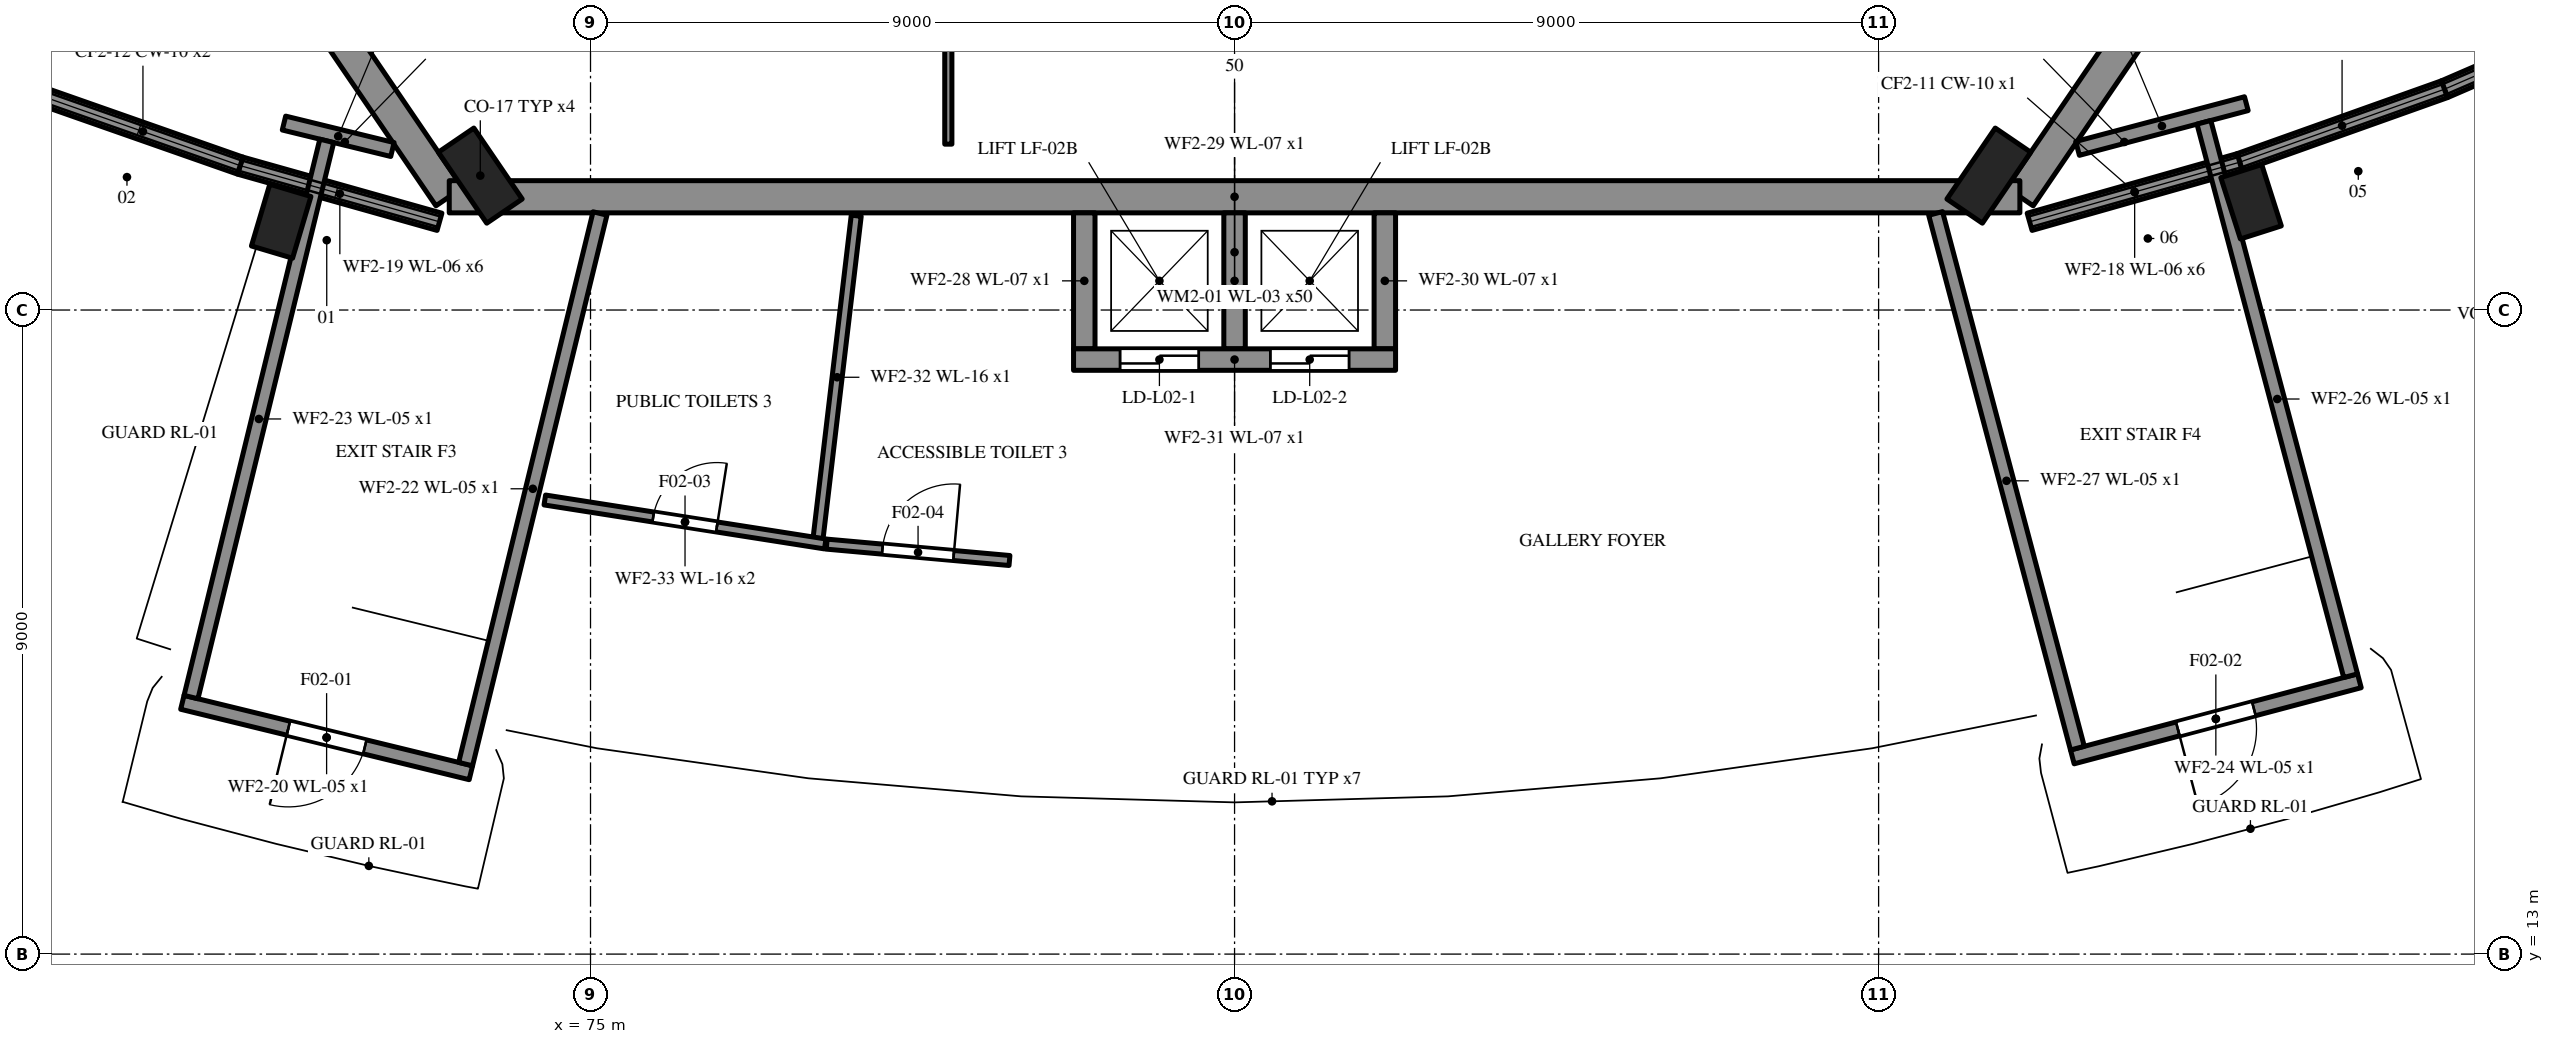
"""IFC4 building model, lengths in metres.
Left out: names, types, materials, properties, quantities, classifications, styles, units other than length and angle.
Written with IfcOpenShell. Run it as: python <this file> out.ifc"""

import sys

from ifc_helpers import new_model, si_unit, direction, frame, frame_2d, origin, origin_2d, place, context, subcontext, project, spatial, polyline, rectangle, outline, extrude, element, fill, save


model = new_model("IFC4")
c1 = context("Model", 3, precision=1e-05, world=origin(), true_north=direction((0.0, 1.0)))
c2 = subcontext(c1, "Body", "Model", "MODEL_VIEW")
j1 = project(units=[si_unit("LENGTHUNIT", "METRE"), si_unit("PLANEANGLEUNIT", "RADIAN")], contexts=[c1])
p1 = place(None, origin())
s1 = spatial("IfcSite", under=j1, at=p1, CompositionType="ELEMENT")
p2 = place(p1, origin())
s2 = spatial("IfcBuilding", under=s1, at=p2, CompositionType="ELEMENT")
p3 = place(p2, frame((0.0, 0.0, 10.2)))
s3 = spatial("IfcBuildingStorey", under=s2, at=p3, CompositionType="ELEMENT", Elevation=10.2)
for number, where, z_axis, x_axis in (
    (1, (94.974, 23.583, 0.0), (0.0, 0.0, 1.0), (0.563, 0.826, 0.0)),
    (2, (71.389, 25.986, 0.0), (0.0, 0.0, 1.0), (0.563, -0.826, 0.0)),
):
    element("IfcWall", number, at=place(p3, frame(where, z_axis=z_axis, x_axis=x_axis)), inside=s3, PredefinedType="SOLIDWALL", context=c2, shape_type="SweptSolid", body=[
        extrude(rectangle(XDim=2.908, YDim=0.45, at=frame_2d((1.454, 0.0))), origin(), (0.0, 0.0, 1.0), 4.6),
    ])
p4 = place(p3, frame((73.026, 23.583, 0.0), z_axis=(0.0, 0.0, 1.0), x_axis=(1.0, 0.0, 0.0)))
e3 = element("IfcWall", 3, at=p4, inside=s3, PredefinedType="SOLIDWALL", context=c2, shape_type="SweptSolid", body=[
    extrude(rectangle(XDim=21.948, YDim=0.45, at=frame_2d((10.974, 0.0))), origin(), (0.0, 0.0, 1.0), 4.6),
])
for number, where, z_axis, x_axis in (
    (4, (94.54, 23.878, 0.0), (0.0, 0.0, 1.0), (0.563, 0.826, 0.0)),
    (5, (73.46, 23.878, 0.0), (0.0, 0.0, 1.0), (0.563, -0.826, 0.0)),
):
    element("IfcColumn", number, at=place(p3, frame(where, z_axis=z_axis, x_axis=x_axis)), inside=s3, PredefinedType="PILASTER", context=c2, shape_type="SweptSolid", body=[
        extrude(rectangle(XDim=1.2, YDim=0.6, at=origin_2d()), origin(), (0.0, 0.0, 1.0), 4.6),
    ])
p5 = place(p3, frame((70.677, 23.241, 0.0), z_axis=(0.0, 0.0, 1.0), x_axis=(-0.285281902737, -0.958443652997, 0.0)))
e6 = element("IfcColumn", 6, at=p5, inside=s3, PredefinedType="PILASTER", context=c2, shape_type="SweptSolid", body=[
    extrude(rectangle(XDim=0.9, YDim=0.6, at=origin_2d()), origin(), (0.0, 0.0, 1.0), 3.868),
])
p6 = place(p3, frame((98.205, 23.513, 0.0), z_axis=(0.0, 0.0, 1.0), x_axis=(0.304171062495, -0.952617428321, 0.0)))
e7 = element("IfcColumn", 7, at=p6, inside=s3, PredefinedType="PILASTER", context=c2, shape_type="SweptSolid", body=[
    extrude(rectangle(XDim=0.9, YDim=0.6, at=origin_2d()), origin(), (0.0, 0.0, 1.0), 3.611),
])
p7 = place(p3, frame((103.696, 26.292, 1.87), z_axis=(0.0, 0.0, 1.0), x_axis=(-0.917822216842, -0.396991660205, 0.0)))
e8 = element("IfcWall", 8, at=p7, inside=s3, PredefinedType="SHEAR", context=c2, shape_type="SweptSolid", body=[
    extrude(outline(polyline([(0.0, 0.0), (3.038, 0.0), (3.038, 1.282), (1.657, 0.884), (1.381, 0.823), (0.0, 0.45), (0.0, 0.0)])), frame((0.0, 0.125, 0.0), z_axis=(0.0, -1.0, 0.0), x_axis=(1.0, 0.0, 0.0)), (0.0, 0.0, 1.0), 0.25),
])
p8 = place(p3, frame((100.907, 25.085, 2.706), z_axis=(0.0, 0.0, 1.0), x_axis=(-0.941947191525, -0.335761058459, 0.0)))
e9 = element("IfcWall", 9, at=p8, inside=s3, PredefinedType="SHEAR", context=c2, shape_type="SweptSolid", body=[
    extrude(outline(polyline([(0.0, 0.0), (3.038, 0.0), (3.038, 1.349), (2.762, 1.275), (0.0, 0.449), (0.0, 0.0)])), frame((0.0, 0.125, 0.0), z_axis=(0.0, -1.0, 0.0), x_axis=(1.0, 0.0, 0.0)), (0.0, 0.0, 1.0), 0.25),
])
p9 = place(p3, frame((98.046, 24.065, 3.607), z_axis=(0.0, 0.0, 1.0), x_axis=(-0.962032579716, -0.272934636065, 0.0)))
e10 = element("IfcWall", 10, at=p9, inside=s3, PredefinedType="SHEAR", context=c2, shape_type="SweptSolid", body=[
    extrude(outline(polyline([(0.0, 0.0), (3.051, 0.0), (3.051, 1.258), (0.277, 0.516), (0.0, 0.449), (0.0, 0.0)])), frame((0.0, 0.125, 0.0), z_axis=(0.0, -1.0, 0.0), x_axis=(1.0, 0.0, 0.0)), (0.0, 0.0, 1.0), 0.25),
])
p10 = place(p3, frame((72.89, 23.233, 3.627), z_axis=(0.0, 0.0, 1.0), x_axis=(-0.962501662404, 0.271275781944, 0.0)))
e11 = element("IfcWall", 11, at=p10, inside=s3, PredefinedType="SHEAR", context=c2, shape_type="SweptSolid", body=[
    extrude(outline(polyline([(0.0, 0.0), (2.893, 0.0), (2.894, 0.449), (2.315, 0.628), (2.025, 0.698), (0.0, 1.203), (0.0, 0.0)])), frame((0.0, 0.125, 0.0), z_axis=(0.0, -1.0, 0.0), x_axis=(1.0, 0.0, 0.0)), (0.0, 0.0, 1.0), 0.25),
])
p11 = place(p3, frame((70.105, 24.018, 2.771), z_axis=(0.0, 0.0, 1.0), x_axis=(-0.943661290444, 0.330912932533, 0.0)))
e12 = element("IfcWall", 12, at=p11, inside=s3, PredefinedType="SHEAR", context=c2, shape_type="SweptSolid", body=[
    extrude(outline(polyline([(0.0, 0.0), (2.88, 0.0), (2.88, 0.449), (0.0, 1.303), (0.0, 0.0)])), frame((0.0, 0.125, 0.0), z_axis=(0.0, -1.0, 0.0), x_axis=(1.0, 0.0, 0.0)), (0.0, 0.0, 1.0), 0.25),
])
p12 = place(p3, frame((80.0, 24.318, 0.0), z_axis=(0.0, 0.0, 1.0), x_axis=(0.0, 1.0, 0.0)))
e13 = element("IfcWall", 13, at=p12, inside=s3, PredefinedType="PARTITIONING", context=c2, shape_type="SweptSolid", body=[
    extrude(rectangle(XDim=5.012, YDim=0.1, at=frame_2d((2.506, 0.0))), origin(), (0.0, 0.0, 1.0), 4.35),
])
p13 = place(p3, frame((73.328, 15.534, 0.0), z_axis=(0.0, 0.0, 1.0), x_axis=(-0.97147374422, 0.237147136374, 0.0)))
e14 = element("IfcWall", 14, at=p13, inside=s3, PredefinedType="SHEAR", context=c2, shape_type="SweptSolid", body=[
    extrude(rectangle(XDim=4.15, YDim=0.2, at=frame_2d((2.075, 0.0))), origin(), (0.0, 0.0, 1.0), 2.733),
])
p14 = place(p13, frame((1.525, 0.0, 0.0)))
e15 = element("IfcOpeningElement", 15, at=p14, cuts=e14, PredefinedType="OPENING", context=c2, shape_type="SweptSolid", body=[
    extrude(rectangle(XDim=1.1, YDim=2.1, at=frame_2d((0.55, 1.05))), frame((0.0, 0.11, 0.0), z_axis=(0.0, -1.0, 0.0), x_axis=(1.0, 0.0, 0.0)), (0.0, 0.0, 1.0), 0.22),
])
p15 = place(p3, frame((72.232, 24.242, 0.0), z_axis=(0.0, 0.0, 1.0), x_axis=(-0.971444715638, 0.237266020446, 0.0)))
e16 = element("IfcWall", 16, at=p15, inside=s3, PredefinedType="SHEAR", context=c2, shape_type="SweptSolid", body=[
    extrude(rectangle(XDim=1.56, YDim=0.2, at=frame_2d((0.78, 0.0))), origin(), (0.0, 0.0, 1.0), 2.733),
])
p16 = place(p3, frame((73.255, 15.655, 0.0), z_axis=(0.0, 0.0, 1.0), x_axis=(0.237142809453, 0.971474800458, 0.0)))
e17 = element("IfcWall", 17, at=p16, inside=s3, PredefinedType="SHEAR", context=c2, shape_type="SweptSolid", body=[
    extrude(rectangle(XDim=7.92, YDim=0.2, at=frame_2d((3.96, 0.0))), origin(), (0.0, 0.0, 1.0), 2.733),
])
p17 = place(p3, frame((69.417, 16.592, 0.0), z_axis=(0.0, 0.0, 1.0), x_axis=(0.2371535898, 0.971472168847, 0.0)))
e18 = element("IfcWall", 18, at=p17, inside=s3, PredefinedType="SHEAR", context=c2, shape_type="SweptSolid", body=[
    extrude(rectangle(XDim=8.0, YDim=0.2, at=frame_2d((4.0, 0.0))), origin(), (0.0, 0.0, 1.0), 2.733),
])
p18 = place(p3, frame((99.718, 16.819, 0.0), z_axis=(0.0, 0.0, 1.0), x_axis=(-0.966590417756, -0.256325894715, 0.0)))
e19 = element("IfcWall", 19, at=p18, inside=s3, PredefinedType="SHEAR", context=c2, shape_type="SweptSolid", body=[
    extrude(rectangle(XDim=4.15, YDim=0.2, at=frame_2d((2.075, 0.0))), origin(), (0.0, 0.0, 1.0), 2.64),
])
p19 = place(p18, frame((1.525, 0.0, 0.0)))
e20 = element("IfcOpeningElement", 20, at=p19, cuts=e19, PredefinedType="OPENING", context=c2, shape_type="SweptSolid", body=[
    extrude(rectangle(XDim=1.1, YDim=2.1, at=frame_2d((0.55, 1.05))), frame((0.0, 0.11, 0.0), z_axis=(0.0, -1.0, 0.0), x_axis=(1.0, 0.0, 0.0)), (0.0, 0.0, 1.0), 0.22),
])
p20 = place(p3, frame((98.138, 24.884, 0.0), z_axis=(0.0, 0.0, 1.0), x_axis=(-0.966582812495, -0.256354572009, 0.0)))
e21 = element("IfcWall", 21, at=p20, inside=s3, PredefinedType="SHEAR", context=c2, shape_type="SweptSolid", body=[
    extrude(rectangle(XDim=2.44, YDim=0.2, at=frame_2d((1.22, 0.0))), origin(), (0.0, 0.0, 1.0), 2.64),
])
p21 = place(p3, frame((99.596, 16.89, 0.0), z_axis=(0.0, 0.0, 1.0), x_axis=(-0.25631948932, 0.966592116352, 0.0)))
e22 = element("IfcWall", 22, at=p21, inside=s3, PredefinedType="SHEAR", context=c2, shape_type="SweptSolid", body=[
    extrude(rectangle(XDim=8.0, YDim=0.2, at=frame_2d((4.0, 0.0))), origin(), (0.0, 0.0, 1.0), 2.64),
])
p22 = place(p3, frame((95.778, 15.878, 0.0), z_axis=(0.0, 0.0, 1.0), x_axis=(-0.256333531377, 0.966588392591, 0.0)))
e23 = element("IfcWall", 23, at=p22, inside=s3, PredefinedType="SHEAR", context=c2, shape_type="SweptSolid", body=[
    extrude(rectangle(XDim=7.73, YDim=0.2, at=frame_2d((3.865, 0.0))), origin(), (0.0, 0.0, 1.0), 2.64),
])
for number, where, z_axis, x_axis in (
    (24, (81.9, 21.458, 0.0), (0.0, 0.0, 1.0), (0.0, 1.0, 0.0)),
    (25, (84.0, 21.458, 0.0), (0.0, 0.0, 1.0), (0.0, 1.0, 0.0)),
    (26, (86.1, 21.458, 0.0), (0.0, 0.0, 1.0), (0.0, 1.0, 0.0)),
):
    element("IfcWall", number, at=place(p3, frame(where, z_axis=z_axis, x_axis=x_axis)), inside=s3, PredefinedType="SHEAR", context=c2, shape_type="SweptSolid", body=[
        extrude(rectangle(XDim=1.9, YDim=0.3, at=frame_2d((0.95, 0.0))), origin(), (0.0, 0.0, 1.0), 4.6),
    ])
p23 = place(p3, frame((81.75, 21.308, 0.0), z_axis=(0.0, 0.0, 1.0), x_axis=(1.0, 0.0, 0.0)))
e27 = element("IfcWall", 27, at=p23, inside=s3, PredefinedType="SHEAR", context=c2, shape_type="SweptSolid", body=[
    extrude(rectangle(XDim=4.5, YDim=0.3, at=frame_2d((2.25, 0.0))), origin(), (0.0, 0.0, 1.0), 4.6),
])
p24 = place(p23, frame((0.65, 0.0, 0.0)))
e28 = element("IfcOpeningElement", 28, at=p24, cuts=e27, PredefinedType="OPENING", context=c2, shape_type="SweptSolid", body=[
    extrude(rectangle(XDim=1.1, YDim=2.2, at=frame_2d((0.55, 1.1))), frame((0.0, 0.16, 0.0), z_axis=(0.0, -1.0, 0.0), x_axis=(1.0, 0.0, 0.0)), (0.0, 0.0, 1.0), 0.32),
])
p25 = place(p23, frame((2.75, 0.0, 0.0)))
e29 = element("IfcOpeningElement", 29, at=p25, cuts=e27, PredefinedType="OPENING", context=c2, shape_type="SweptSolid", body=[
    extrude(rectangle(XDim=1.1, YDim=2.2, at=frame_2d((0.55, 1.1))), frame((0.0, 0.16, 0.0), z_axis=(0.0, -1.0, 0.0), x_axis=(1.0, 0.0, 0.0)), (0.0, 0.0, 1.0), 0.32),
])
p26 = place(p3, frame((78.713, 23.318, 0.0), z_axis=(0.0, 0.0, 1.0), x_axis=(-0.117508051617, -0.993071929824, 0.0)))
e30 = element("IfcWall", 30, at=p26, inside=s3, PredefinedType="PARTITIONING", context=c2, shape_type="SweptSolid", body=[
    extrude(rectangle(XDim=4.546, YDim=0.14, at=frame_2d((2.273, 0.0))), origin(), (0.0, 0.0, 1.0), 4.314),
])
p27 = place(p3, frame((74.361, 19.346, 0.0), z_axis=(0.0, 0.0, 1.0), x_axis=(0.987917678703, -0.154979547379, 0.0)))
e31 = element("IfcWall", 31, at=p27, inside=s3, PredefinedType="PARTITIONING", context=c2, shape_type="SweptSolid", body=[
    extrude(rectangle(XDim=3.967, YDim=0.14, at=frame_2d((1.983, 0.0))), origin(), (0.0, 0.0, 1.0), 4.314),
])
p28 = place(p27, frame((1.533, 0.0, 0.0)))
e32 = element("IfcOpeningElement", 32, at=p28, cuts=e31, PredefinedType="OPENING", context=c2, shape_type="SweptSolid", body=[
    extrude(rectangle(XDim=0.9, YDim=2.1, at=frame_2d((0.45, 1.05))), frame((0.0, 0.08, 0.0), z_axis=(0.0, -1.0, 0.0), x_axis=(1.0, 0.0, 0.0)), (0.0, 0.0, 1.0), 0.16),
])
p29 = place(p3, frame((78.3, 18.729, 0.0), z_axis=(0.0, 0.0, 1.0), x_axis=(0.996014787006, -0.08918825071, 0.0)))
e33 = element("IfcWall", 33, at=p29, inside=s3, PredefinedType="PARTITIONING", context=c2, shape_type="SweptSolid", body=[
    extrude(rectangle(XDim=2.565, YDim=0.14, at=frame_2d((1.282, 0.0))), origin(), (0.0, 0.0, 1.0), 4.857),
])
p30 = place(p29, frame((0.782, 0.0, 0.0)))
e34 = element("IfcOpeningElement", 34, at=p30, cuts=e33, PredefinedType="OPENING", context=c2, shape_type="SweptSolid", body=[
    extrude(rectangle(XDim=1.0, YDim=2.1, at=frame_2d((0.5, 1.05))), frame((0.0, 0.08, 0.0), z_axis=(0.0, -1.0, 0.0), x_axis=(1.0, 0.0, 0.0)), (0.0, 0.0, 1.0), 0.16),
])
p31 = place(p14, origin())
e35 = element("IfcDoor", 35, at=p31, inside=s3, OperationType="SINGLE_SWING_RIGHT", PredefinedType="DOOR", context=c2, shape_type="SweptSolid", body=[
    extrude(rectangle(XDim=1.1, YDim=2.1, at=frame_2d((0.55, 1.05))), frame((0.0, 0.025, 0.0), z_axis=(0.0, -1.0, 0.0), x_axis=(1.0, 0.0, 0.0)), (0.0, 0.0, 1.0), 0.05),
])
fill(e15, e35)
p32 = place(p19, origin())
e36 = element("IfcDoor", 36, at=p32, inside=s3, OperationType="SINGLE_SWING_RIGHT", PredefinedType="DOOR", context=c2, shape_type="SweptSolid", body=[
    extrude(rectangle(XDim=1.1, YDim=2.1, at=frame_2d((0.55, 1.05))), frame((0.0, 0.025, 0.0), z_axis=(0.0, -1.0, 0.0), x_axis=(1.0, 0.0, 0.0)), (0.0, 0.0, 1.0), 0.05),
])
fill(e20, e36)
p33 = place(p24, origin())
e37 = element("IfcDoor", 37, at=p33, inside=s3, OperationType="SLIDING_TO_LEFT", PredefinedType="DOOR", context=c2, shape_type="SweptSolid", body=[
    extrude(rectangle(XDim=1.1, YDim=2.2, at=frame_2d((0.55, 1.1))), frame((0.0, 0.025, 0.0), z_axis=(0.0, -1.0, 0.0), x_axis=(1.0, 0.0, 0.0)), (0.0, 0.0, 1.0), 0.05),
])
fill(e28, e37)
p34 = place(p25, origin())
e38 = element("IfcDoor", 38, at=p34, inside=s3, OperationType="SLIDING_TO_LEFT", PredefinedType="DOOR", context=c2, shape_type="SweptSolid", body=[
    extrude(rectangle(XDim=1.1, YDim=2.2, at=frame_2d((0.55, 1.1))), frame((0.0, 0.025, 0.0), z_axis=(0.0, -1.0, 0.0), x_axis=(1.0, 0.0, 0.0)), (0.0, 0.0, 1.0), 0.05),
])
fill(e29, e38)
p35 = place(p28, origin())
e39 = element("IfcDoor", 39, at=p35, inside=s3, OperationType="SINGLE_SWING_RIGHT", PredefinedType="DOOR", context=c2, shape_type="SweptSolid", body=[
    extrude(rectangle(XDim=0.9, YDim=2.1, at=frame_2d((0.45, 1.05))), frame((0.0, 0.025, 0.0), z_axis=(0.0, -1.0, 0.0), x_axis=(1.0, 0.0, 0.0)), (0.0, 0.0, 1.0), 0.05),
])
fill(e32, e39)
p36 = place(p30, origin())
e40 = element("IfcDoor", 40, at=p36, inside=s3, OperationType="SINGLE_SWING_RIGHT", PredefinedType="DOOR", context=c2, shape_type="SweptSolid", body=[
    extrude(rectangle(XDim=1.0, YDim=2.1, at=frame_2d((0.5, 1.05))), frame((0.0, 0.025, 0.0), z_axis=(0.0, -1.0, 0.0), x_axis=(1.0, 0.0, 0.0)), (0.0, 0.0, 1.0), 0.05),
])
fill(e34, e40)
save(model, sys.argv[1])
